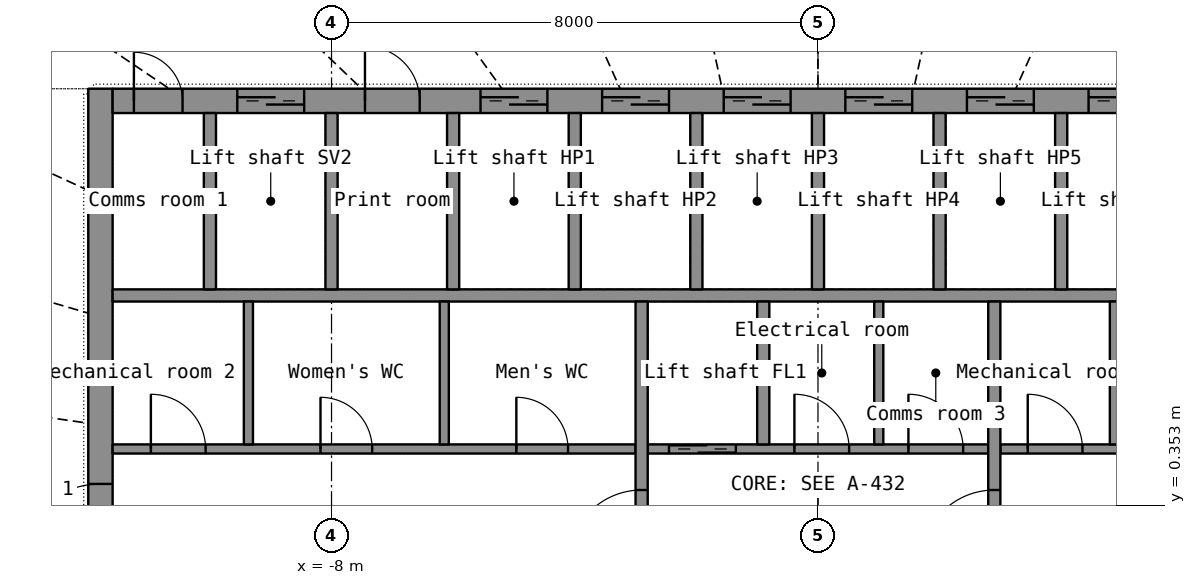
"""IFC4 building model, lengths in metres.
Left out: names, types, materials, properties, quantities, classifications, styles, units other than length and angle.
Written with IfcOpenShell. Run it as: python <this file> out.ifc"""

import sys

from ifc_helpers import new_model, si_unit, direction, frame, frame_2d, origin, place, context, subcontext, project, spatial, rectangle, extrude, element, fill, save


model = new_model("IFC4")
c1 = context("Model", 3, precision=1e-05, world=origin(), true_north=direction((0.0, 1.0)))
c2 = subcontext(c1, "Body", "Model", "MODEL_VIEW")
j1 = project(units=[si_unit("LENGTHUNIT", "METRE"), si_unit("PLANEANGLEUNIT", "RADIAN")], contexts=[c1])
p1 = place(None, origin())
s1 = spatial("IfcSite", under=j1, at=p1, CompositionType="ELEMENT")
p2 = place(p1, origin())
s2 = spatial("IfcBuilding", under=s1, at=p2, CompositionType="ELEMENT")
p3 = place(p2, frame((0.0, 0.0, 257.8)))
s3 = spatial("IfcBuildingStorey", under=s2, at=p3, CompositionType="ELEMENT", Elevation=257.8)
p4 = place(p3, frame((-11.8, -7.2, 0.0), z_axis=(0.0, 0.0, 1.0), x_axis=(0.0, 1.0, 0.0)))
e1 = element("IfcWall", 1, at=p4, inside=s3, PredefinedType="SHEAR", context=c2, shape_type="SweptSolid", body=[
    extrude(rectangle(XDim=14.4, YDim=0.4, at=frame_2d((7.2, 0.0))), origin(), (0.0, 0.0, 1.0), 3.3),
])
p5 = place(p4, frame((6.5, 0.0, 0.0)))
e2 = element("IfcOpeningElement", 2, at=p5, cuts=e1, PredefinedType="OPENING", context=c2, shape_type="SweptSolid", body=[
    extrude(rectangle(XDim=1.4, YDim=2.2, at=frame_2d((0.7, 1.1))), frame((0.0, 0.21, 0.0), z_axis=(0.0, -1.0, 0.0), x_axis=(1.0, 0.0, 0.0)), (0.0, 0.0, 1.0), 0.42),
])
p6 = place(p3, frame((-11.6, 7.0, 0.0), z_axis=(0.0, 0.0, 1.0), x_axis=(1.0, 0.0, 0.0)))
e3 = element("IfcWall", 3, at=p6, inside=s3, PredefinedType="SHEAR", context=c2, shape_type="SweptSolid", body=[
    extrude(rectangle(XDim=23.2, YDim=0.4, at=frame_2d((11.6, 0.0))), origin(), (0.0, 0.0, 1.0), 3.3),
])
p7 = place(p6, frame((2.05, 0.0, 0.0)))
e4 = element("IfcOpeningElement", 4, at=p7, cuts=e3, PredefinedType="OPENING", context=c2, shape_type="SweptSolid", body=[
    extrude(rectangle(XDim=1.1, YDim=2.2, at=frame_2d((0.55, 1.1))), frame((0.0, 0.21, 0.0), z_axis=(0.0, -1.0, 0.0), x_axis=(1.0, 0.0, 0.0)), (0.0, 0.0, 1.0), 0.42),
])
p8 = place(p6, frame((6.05, 0.0, 0.0)))
e5 = element("IfcOpeningElement", 5, at=p8, cuts=e3, PredefinedType="OPENING", context=c2, shape_type="SweptSolid", body=[
    extrude(rectangle(XDim=1.1, YDim=2.2, at=frame_2d((0.55, 1.1))), frame((0.0, 0.21, 0.0), z_axis=(0.0, -1.0, 0.0), x_axis=(1.0, 0.0, 0.0)), (0.0, 0.0, 1.0), 0.42),
])
p9 = place(p6, frame((8.05, 0.0, 0.0)))
e6 = element("IfcOpeningElement", 6, at=p9, cuts=e3, PredefinedType="OPENING", context=c2, shape_type="SweptSolid", body=[
    extrude(rectangle(XDim=1.1, YDim=2.2, at=frame_2d((0.55, 1.1))), frame((0.0, 0.21, 0.0), z_axis=(0.0, -1.0, 0.0), x_axis=(1.0, 0.0, 0.0)), (0.0, 0.0, 1.0), 0.42),
])
p10 = place(p6, frame((10.05, 0.0, 0.0)))
e7 = element("IfcOpeningElement", 7, at=p10, cuts=e3, PredefinedType="OPENING", context=c2, shape_type="SweptSolid", body=[
    extrude(rectangle(XDim=1.1, YDim=2.2, at=frame_2d((0.55, 1.1))), frame((0.0, 0.21, 0.0), z_axis=(0.0, -1.0, 0.0), x_axis=(1.0, 0.0, 0.0)), (0.0, 0.0, 1.0), 0.42),
])
p11 = place(p6, frame((12.05, 0.0, 0.0)))
e8 = element("IfcOpeningElement", 8, at=p11, cuts=e3, PredefinedType="OPENING", context=c2, shape_type="SweptSolid", body=[
    extrude(rectangle(XDim=1.1, YDim=2.2, at=frame_2d((0.55, 1.1))), frame((0.0, 0.21, 0.0), z_axis=(0.0, -1.0, 0.0), x_axis=(1.0, 0.0, 0.0)), (0.0, 0.0, 1.0), 0.42),
])
p12 = place(p6, frame((14.05, 0.0, 0.0)))
e9 = element("IfcOpeningElement", 9, at=p12, cuts=e3, PredefinedType="OPENING", context=c2, shape_type="SweptSolid", body=[
    extrude(rectangle(XDim=1.1, YDim=2.2, at=frame_2d((0.55, 1.1))), frame((0.0, 0.21, 0.0), z_axis=(0.0, -1.0, 0.0), x_axis=(1.0, 0.0, 0.0)), (0.0, 0.0, 1.0), 0.42),
])
p13 = place(p6, frame((16.05, 0.0, 0.0)))
e10 = element("IfcOpeningElement", 10, at=p13, cuts=e3, PredefinedType="OPENING", context=c2, shape_type="SweptSolid", body=[
    extrude(rectangle(XDim=1.1, YDim=2.2, at=frame_2d((0.55, 1.1))), frame((0.0, 0.21, 0.0), z_axis=(0.0, -1.0, 0.0), x_axis=(1.0, 0.0, 0.0)), (0.0, 0.0, 1.0), 0.42),
])
p14 = place(p6, frame((18.05, 0.0, 0.0)))
e11 = element("IfcOpeningElement", 11, at=p14, cuts=e3, PredefinedType="OPENING", context=c2, shape_type="SweptSolid", body=[
    extrude(rectangle(XDim=1.1, YDim=2.2, at=frame_2d((0.55, 1.1))), frame((0.0, 0.21, 0.0), z_axis=(0.0, -1.0, 0.0), x_axis=(1.0, 0.0, 0.0)), (0.0, 0.0, 1.0), 0.42),
])
p15 = place(p6, frame((20.05, 0.0, 0.0)))
e12 = element("IfcOpeningElement", 12, at=p15, cuts=e3, PredefinedType="OPENING", context=c2, shape_type="SweptSolid", body=[
    extrude(rectangle(XDim=1.1, YDim=2.2, at=frame_2d((0.55, 1.1))), frame((0.0, 0.21, 0.0), z_axis=(0.0, -1.0, 0.0), x_axis=(1.0, 0.0, 0.0)), (0.0, 0.0, 1.0), 0.42),
])
p16 = place(p6, frame((4.15, 0.0, 0.0)))
e13 = element("IfcOpeningElement", 13, at=p16, cuts=e3, PredefinedType="OPENING", context=c2, shape_type="SweptSolid", body=[
    extrude(rectangle(XDim=0.9, YDim=2.1, at=frame_2d((0.45, 1.05))), frame((0.0, 0.21, 0.0), z_axis=(0.0, -1.0, 0.0), x_axis=(1.0, 0.0, 0.0)), (0.0, 0.0, 1.0), 0.42),
])
p17 = place(p6, frame((0.35, 0.0, 0.0)))
e14 = element("IfcOpeningElement", 14, at=p17, cuts=e3, PredefinedType="OPENING", context=c2, shape_type="SweptSolid", body=[
    extrude(rectangle(XDim=0.8, YDim=2.05, at=frame_2d((0.4, 1.025))), frame((0.0, 0.21, 0.0), z_axis=(0.0, -1.0, 0.0), x_axis=(1.0, 0.0, 0.0)), (0.0, 0.0, 1.0), 0.42),
])
p18 = place(p6, frame((22.05, 0.0, 0.0)))
e15 = element("IfcOpeningElement", 15, at=p18, cuts=e3, PredefinedType="OPENING", context=c2, shape_type="SweptSolid", body=[
    extrude(rectangle(XDim=0.8, YDim=2.05, at=frame_2d((0.4, 1.025))), frame((0.0, 0.21, 0.0), z_axis=(0.0, -1.0, 0.0), x_axis=(1.0, 0.0, 0.0)), (0.0, 0.0, 1.0), 0.42),
])
p19 = place(p3, frame((-11.6, 3.8, 0.0), z_axis=(0.0, 0.0, 1.0), x_axis=(1.0, 0.0, 0.0)))
e16 = element("IfcWall", 16, at=p19, inside=s3, PredefinedType="SHEAR", context=c2, shape_type="SweptSolid", body=[
    extrude(rectangle(XDim=23.2, YDim=0.2, at=frame_2d((11.6, 0.0))), origin(), (0.0, 0.0, 1.0), 3.3),
])
for number, where, z_axis, x_axis in (
    (17, (-10.0, 3.9, 0.0), (0.0, 0.0, 1.0), (0.0, 1.0, 0.0)),
    (18, (-8.0, 3.9, 0.0), (0.0, 0.0, 1.0), (0.0, 1.0, 0.0)),
    (19, (-6.0, 3.9, 0.0), (0.0, 0.0, 1.0), (0.0, 1.0, 0.0)),
    (20, (-4.0, 3.9, 0.0), (0.0, 0.0, 1.0), (0.0, 1.0, 0.0)),
    (21, (-2.0, 3.9, 0.0), (0.0, 0.0, 1.0), (0.0, 1.0, 0.0)),
    (22, (0.0, 3.9, 0.0), (0.0, 0.0, 1.0), (0.0, 1.0, 0.0)),
    (23, (2.0, 3.9, 0.0), (0.0, 0.0, 1.0), (0.0, 1.0, 0.0)),
    (24, (4.0, 3.9, 0.0), (0.0, 0.0, 1.0), (0.0, 1.0, 0.0)),
):
    element("IfcWall", number, at=place(p3, frame(where, z_axis=z_axis, x_axis=x_axis)), inside=s3, PredefinedType="SHEAR", context=c2, shape_type="SweptSolid", body=[
        extrude(rectangle(XDim=2.9, YDim=0.2, at=frame_2d((1.45, 0.0))), origin(), (0.0, 0.0, 1.0), 3.3),
    ])
p20 = place(p3, frame((-11.6, 1.275, 0.0), z_axis=(0.0, 0.0, 1.0), x_axis=(1.0, 0.0, 0.0)))
e25 = element("IfcWall", 25, at=p20, inside=s3, PredefinedType="PARTITIONING", context=c2, shape_type="SweptSolid", body=[
    extrude(rectangle(XDim=8.6, YDim=0.15, at=frame_2d((4.3, 0.0))), origin(), (0.0, 0.0, 1.0), 3.3),
])
p21 = place(p20, frame((0.629, 0.0, 0.0)))
e26 = element("IfcOpeningElement", 26, at=p21, cuts=e25, PredefinedType="OPENING", context=c2, shape_type="SweptSolid", body=[
    extrude(rectangle(XDim=0.9, YDim=2.1, at=frame_2d((0.45, 1.05))), frame((0.0, 0.085, 0.0), z_axis=(0.0, -1.0, 0.0), x_axis=(1.0, 0.0, 0.0)), (0.0, 0.0, 1.0), 0.17),
])
p22 = place(p20, frame((3.418, 0.0, 0.0)))
e27 = element("IfcOpeningElement", 27, at=p22, cuts=e25, PredefinedType="OPENING", context=c2, shape_type="SweptSolid", body=[
    extrude(rectangle(XDim=0.85, YDim=2.1, at=frame_2d((0.425, 1.05))), frame((0.0, 0.085, 0.0), z_axis=(0.0, -1.0, 0.0), x_axis=(1.0, 0.0, 0.0)), (0.0, 0.0, 1.0), 0.17),
])
p23 = place(p20, frame((6.639, 0.0, 0.0)))
e28 = element("IfcOpeningElement", 28, at=p23, cuts=e25, PredefinedType="OPENING", context=c2, shape_type="SweptSolid", body=[
    extrude(rectangle(XDim=0.85, YDim=2.1, at=frame_2d((0.425, 1.05))), frame((0.0, 0.085, 0.0), z_axis=(0.0, -1.0, 0.0), x_axis=(1.0, 0.0, 0.0)), (0.0, 0.0, 1.0), 0.17),
])
p24 = place(p3, frame((-2.8, 1.275, 0.0), z_axis=(0.0, 0.0, 1.0), x_axis=(1.0, 0.0, 0.0)))
e29 = element("IfcWall", 29, at=p24, inside=s3, PredefinedType="SHEAR", context=c2, shape_type="SweptSolid", body=[
    extrude(rectangle(XDim=5.6, YDim=0.15, at=frame_2d((2.8, 0.0))), origin(), (0.0, 0.0, 1.0), 3.3),
])
p25 = place(p24, frame((0.35, 0.0, 0.0)))
e30 = element("IfcOpeningElement", 30, at=p25, cuts=e29, PredefinedType="OPENING", context=c2, shape_type="SweptSolid", body=[
    extrude(rectangle(XDim=1.1, YDim=2.2, at=frame_2d((0.55, 1.1))), frame((0.0, 0.085, 0.0), z_axis=(0.0, -1.0, 0.0), x_axis=(1.0, 0.0, 0.0)), (0.0, 0.0, 1.0), 0.17),
])
p26 = place(p24, frame((2.413, 0.0, 0.0)))
e31 = element("IfcOpeningElement", 31, at=p26, cuts=e29, PredefinedType="OPENING", context=c2, shape_type="SweptSolid", body=[
    extrude(rectangle(XDim=0.9, YDim=2.1, at=frame_2d((0.45, 1.05))), frame((0.0, 0.085, 0.0), z_axis=(0.0, -1.0, 0.0), x_axis=(1.0, 0.0, 0.0)), (0.0, 0.0, 1.0), 0.17),
])
p27 = place(p24, frame((4.288, 0.0, 0.0)))
e32 = element("IfcOpeningElement", 32, at=p27, cuts=e29, PredefinedType="OPENING", context=c2, shape_type="SweptSolid", body=[
    extrude(rectangle(XDim=0.9, YDim=2.1, at=frame_2d((0.45, 1.05))), frame((0.0, 0.085, 0.0), z_axis=(0.0, -1.0, 0.0), x_axis=(1.0, 0.0, 0.0)), (0.0, 0.0, 1.0), 0.17),
])
p28 = place(p3, frame((3.0, 1.275, 0.0), z_axis=(0.0, 0.0, 1.0), x_axis=(1.0, 0.0, 0.0)))
e33 = element("IfcWall", 33, at=p28, inside=s3, PredefinedType="SHEAR", context=c2, shape_type="SweptSolid", body=[
    extrude(rectangle(XDim=8.6, YDim=0.15, at=frame_2d((4.3, 0.0))), origin(), (0.0, 0.0, 1.0), 3.3),
])
p29 = place(p28, frame((2.05, 0.0, 0.0)))
e34 = element("IfcOpeningElement", 34, at=p29, cuts=e33, PredefinedType="OPENING", context=c2, shape_type="SweptSolid", body=[
    extrude(rectangle(XDim=1.1, YDim=2.15, at=frame_2d((0.55, 1.075))), frame((0.0, 0.085, 0.0), z_axis=(0.0, -1.0, 0.0), x_axis=(1.0, 0.0, 0.0)), (0.0, 0.0, 1.0), 0.17),
])
p30 = place(p28, frame((0.45, 0.0, 0.0)))
e35 = element("IfcOpeningElement", 35, at=p30, cuts=e33, PredefinedType="OPENING", context=c2, shape_type="SweptSolid", body=[
    extrude(rectangle(XDim=0.9, YDim=2.1, at=frame_2d((0.45, 1.05))), frame((0.0, 0.085, 0.0), z_axis=(0.0, -1.0, 0.0), x_axis=(1.0, 0.0, 0.0)), (0.0, 0.0, 1.0), 0.17),
])
p31 = place(p3, frame((-2.9, -3.7, 0.0), z_axis=(0.0, 0.0, 1.0), x_axis=(0.0, 1.0, 0.0)))
e36 = element("IfcWall", 36, at=p31, inside=s3, PredefinedType="SHEAR", context=c2, shape_type="SweptSolid", body=[
    extrude(rectangle(XDim=7.4, YDim=0.2, at=frame_2d((3.7, 0.0))), origin(), (0.0, 0.0, 1.0), 3.3),
])
p32 = place(p31, frame((3.1, 0.0, 0.0)))
e37 = element("IfcOpeningElement", 37, at=p32, cuts=e36, PredefinedType="OPENING", context=c2, shape_type="SweptSolid", body=[
    extrude(rectangle(XDim=1.2, YDim=2.2, at=frame_2d((0.6, 1.1))), frame((0.0, 0.11, 0.0), z_axis=(0.0, -1.0, 0.0), x_axis=(1.0, 0.0, 0.0)), (0.0, 0.0, 1.0), 0.22),
])
p33 = place(p3, frame((2.9, -3.7, 0.0), z_axis=(0.0, 0.0, 1.0), x_axis=(0.0, 1.0, 0.0)))
e38 = element("IfcWall", 38, at=p33, inside=s3, PredefinedType="SHEAR", context=c2, shape_type="SweptSolid", body=[
    extrude(rectangle(XDim=7.4, YDim=0.2, at=frame_2d((3.7, 0.0))), origin(), (0.0, 0.0, 1.0), 3.3),
])
p34 = place(p33, frame((3.1, 0.0, 0.0)))
e39 = element("IfcOpeningElement", 39, at=p34, cuts=e38, PredefinedType="OPENING", context=c2, shape_type="SweptSolid", body=[
    extrude(rectangle(XDim=1.2, YDim=2.2, at=frame_2d((0.6, 1.1))), frame((0.0, 0.11, 0.0), z_axis=(0.0, -1.0, 0.0), x_axis=(1.0, 0.0, 0.0)), (0.0, 0.0, 1.0), 0.22),
])
for number, where, z_axis, x_axis in (
    (40, (-0.9, 1.35, 0.0), (0.0, 0.0, 1.0), (0.0, 1.0, 0.0)),
    (41, (4.9, 1.35, 0.0), (0.0, 0.0, 1.0), (0.0, 1.0, 0.0)),
):
    element("IfcWall", number, at=place(p3, frame(where, z_axis=z_axis, x_axis=x_axis)), inside=s3, PredefinedType="SHEAR", context=c2, shape_type="SweptSolid", body=[
        extrude(rectangle(XDim=2.35, YDim=0.2, at=frame_2d((1.175, 0.0))), origin(), (0.0, 0.0, 1.0), 3.3),
    ])
for number, where, z_axis, x_axis in (
    (42, (-9.367, 1.35, 0.0), (0.0, 0.0, 1.0), (0.0, 1.0, 0.0)),
    (43, (-6.146, 1.35, 0.0), (0.0, 0.0, 1.0), (0.0, 1.0, 0.0)),
    (44, (1.0, 1.35, 0.0), (0.0, 0.0, 1.0), (0.0, 1.0, 0.0)),
):
    element("IfcWall", number, at=place(p3, frame(where, z_axis=z_axis, x_axis=x_axis)), inside=s3, PredefinedType="PARTITIONING", context=c2, shape_type="SweptSolid", body=[
        extrude(rectangle(XDim=2.35, YDim=0.15, at=frame_2d((1.175, 0.0))), origin(), (0.0, 0.0, 1.0), 3.3),
    ])
p35 = place(p7, origin())
e45 = element("IfcDoor", 45, at=p35, inside=s3, OperationType="DOUBLE_DOOR_SLIDING", PredefinedType="DOOR", context=c2, shape_type="SweptSolid", body=[
    extrude(rectangle(XDim=1.1, YDim=2.2, at=frame_2d((0.55, 1.1))), frame((0.0, 0.025, 0.0), z_axis=(0.0, -1.0, 0.0), x_axis=(1.0, 0.0, 0.0)), (0.0, 0.0, 1.0), 0.05),
])
fill(e4, e45)
p36 = place(p8, origin())
e46 = element("IfcDoor", 46, at=p36, inside=s3, OperationType="DOUBLE_DOOR_SLIDING", PredefinedType="DOOR", context=c2, shape_type="SweptSolid", body=[
    extrude(rectangle(XDim=1.1, YDim=2.2, at=frame_2d((0.55, 1.1))), frame((0.0, 0.025, 0.0), z_axis=(0.0, -1.0, 0.0), x_axis=(1.0, 0.0, 0.0)), (0.0, 0.0, 1.0), 0.05),
])
fill(e5, e46)
p37 = place(p9, origin())
e47 = element("IfcDoor", 47, at=p37, inside=s3, OperationType="DOUBLE_DOOR_SLIDING", PredefinedType="DOOR", context=c2, shape_type="SweptSolid", body=[
    extrude(rectangle(XDim=1.1, YDim=2.2, at=frame_2d((0.55, 1.1))), frame((0.0, 0.025, 0.0), z_axis=(0.0, -1.0, 0.0), x_axis=(1.0, 0.0, 0.0)), (0.0, 0.0, 1.0), 0.05),
])
fill(e6, e47)
p38 = place(p10, origin())
e48 = element("IfcDoor", 48, at=p38, inside=s3, OperationType="DOUBLE_DOOR_SLIDING", PredefinedType="DOOR", context=c2, shape_type="SweptSolid", body=[
    extrude(rectangle(XDim=1.1, YDim=2.2, at=frame_2d((0.55, 1.1))), frame((0.0, 0.025, 0.0), z_axis=(0.0, -1.0, 0.0), x_axis=(1.0, 0.0, 0.0)), (0.0, 0.0, 1.0), 0.05),
])
fill(e7, e48)
p39 = place(p11, origin())
e49 = element("IfcDoor", 49, at=p39, inside=s3, OperationType="DOUBLE_DOOR_SLIDING", PredefinedType="DOOR", context=c2, shape_type="SweptSolid", body=[
    extrude(rectangle(XDim=1.1, YDim=2.2, at=frame_2d((0.55, 1.1))), frame((0.0, 0.025, 0.0), z_axis=(0.0, -1.0, 0.0), x_axis=(1.0, 0.0, 0.0)), (0.0, 0.0, 1.0), 0.05),
])
fill(e8, e49)
p40 = place(p12, origin())
e50 = element("IfcDoor", 50, at=p40, inside=s3, OperationType="DOUBLE_DOOR_SLIDING", PredefinedType="DOOR", context=c2, shape_type="SweptSolid", body=[
    extrude(rectangle(XDim=1.1, YDim=2.2, at=frame_2d((0.55, 1.1))), frame((0.0, 0.025, 0.0), z_axis=(0.0, -1.0, 0.0), x_axis=(1.0, 0.0, 0.0)), (0.0, 0.0, 1.0), 0.05),
])
fill(e9, e50)
p41 = place(p13, origin())
e51 = element("IfcDoor", 51, at=p41, inside=s3, OperationType="DOUBLE_DOOR_SLIDING", PredefinedType="DOOR", context=c2, shape_type="SweptSolid", body=[
    extrude(rectangle(XDim=1.1, YDim=2.2, at=frame_2d((0.55, 1.1))), frame((0.0, 0.025, 0.0), z_axis=(0.0, -1.0, 0.0), x_axis=(1.0, 0.0, 0.0)), (0.0, 0.0, 1.0), 0.05),
])
fill(e10, e51)
p42 = place(p16, origin())
e52 = element("IfcDoor", 52, at=p42, inside=s3, OperationType="SINGLE_SWING_LEFT", PredefinedType="DOOR", context=c2, shape_type="SweptSolid", body=[
    extrude(rectangle(XDim=0.9, YDim=2.1, at=frame_2d((0.45, 1.05))), frame((0.0, 0.025, 0.0), z_axis=(0.0, -1.0, 0.0), x_axis=(1.0, 0.0, 0.0)), (0.0, 0.0, 1.0), 0.05),
])
fill(e13, e52)
p43 = place(p17, origin())
e53 = element("IfcDoor", 53, at=p43, inside=s3, OperationType="SINGLE_SWING_LEFT", PredefinedType="DOOR", context=c2, shape_type="SweptSolid", body=[
    extrude(rectangle(XDim=0.8, YDim=2.05, at=frame_2d((0.4, 1.025))), frame((0.0, 0.025, 0.0), z_axis=(0.0, -1.0, 0.0), x_axis=(1.0, 0.0, 0.0)), (0.0, 0.0, 1.0), 0.05),
])
fill(e14, e53)
p44 = place(p5, origin())
e54 = element("IfcDoor", 54, at=p44, inside=s3, OperationType="DOUBLE_DOOR_SINGLE_SWING", PredefinedType="DOOR", context=c2, shape_type="SweptSolid", body=[
    extrude(rectangle(XDim=1.4, YDim=2.2, at=frame_2d((0.7, 1.1))), frame((0.0, 0.025, 0.0), z_axis=(0.0, -1.0, 0.0), x_axis=(1.0, 0.0, 0.0)), (0.0, 0.0, 1.0), 0.05),
])
fill(e2, e54)
p45 = place(p32, origin())
e55 = element("IfcDoor", 55, at=p45, inside=s3, OperationType="SINGLE_SWING_LEFT", PredefinedType="DOOR", context=c2, shape_type="SweptSolid", body=[
    extrude(rectangle(XDim=1.2, YDim=2.2, at=frame_2d((0.6, 1.1))), frame((0.0, 0.025, 0.0), z_axis=(0.0, -1.0, 0.0), x_axis=(1.0, 0.0, 0.0)), (0.0, 0.0, 1.0), 0.05),
])
fill(e37, e55)
p46 = place(p34, origin())
e56 = element("IfcDoor", 56, at=p46, inside=s3, OperationType="SINGLE_SWING_LEFT", PredefinedType="DOOR", context=c2, shape_type="SweptSolid", body=[
    extrude(rectangle(XDim=1.2, YDim=2.2, at=frame_2d((0.6, 1.1))), frame((0.0, 0.025, 0.0), z_axis=(0.0, -1.0, 0.0), x_axis=(1.0, 0.0, 0.0)), (0.0, 0.0, 1.0), 0.05),
])
fill(e39, e56)
p47 = place(p25, origin())
e57 = element("IfcDoor", 57, at=p47, inside=s3, OperationType="DOUBLE_DOOR_SLIDING", PredefinedType="DOOR", context=c2, shape_type="SweptSolid", body=[
    extrude(rectangle(XDim=1.1, YDim=2.2, at=frame_2d((0.55, 1.1))), frame((0.0, 0.025, 0.0), z_axis=(0.0, -1.0, 0.0), x_axis=(1.0, 0.0, 0.0)), (0.0, 0.0, 1.0), 0.05),
])
fill(e30, e57)
p48 = place(p21, origin())
e58 = element("IfcDoor", 58, at=p48, inside=s3, OperationType="SINGLE_SWING_LEFT", PredefinedType="DOOR", context=c2, shape_type="SweptSolid", body=[
    extrude(rectangle(XDim=0.9, YDim=2.1, at=frame_2d((0.45, 1.05))), frame((0.0, 0.025, 0.0), z_axis=(0.0, -1.0, 0.0), x_axis=(1.0, 0.0, 0.0)), (0.0, 0.0, 1.0), 0.05),
])
fill(e26, e58)
p49 = place(p22, origin())
e59 = element("IfcDoor", 59, at=p49, inside=s3, OperationType="SINGLE_SWING_LEFT", PredefinedType="DOOR", context=c2, shape_type="SweptSolid", body=[
    extrude(rectangle(XDim=0.85, YDim=2.1, at=frame_2d((0.425, 1.05))), frame((0.0, 0.025, 0.0), z_axis=(0.0, -1.0, 0.0), x_axis=(1.0, 0.0, 0.0)), (0.0, 0.0, 1.0), 0.05),
])
fill(e27, e59)
p50 = place(p23, origin())
e60 = element("IfcDoor", 60, at=p50, inside=s3, OperationType="SINGLE_SWING_LEFT", PredefinedType="DOOR", context=c2, shape_type="SweptSolid", body=[
    extrude(rectangle(XDim=0.85, YDim=2.1, at=frame_2d((0.425, 1.05))), frame((0.0, 0.025, 0.0), z_axis=(0.0, -1.0, 0.0), x_axis=(1.0, 0.0, 0.0)), (0.0, 0.0, 1.0), 0.05),
])
fill(e28, e60)
p51 = place(p26, origin())
e61 = element("IfcDoor", 61, at=p51, inside=s3, OperationType="SINGLE_SWING_LEFT", PredefinedType="DOOR", context=c2, shape_type="SweptSolid", body=[
    extrude(rectangle(XDim=0.9, YDim=2.1, at=frame_2d((0.45, 1.05))), frame((0.0, 0.025, 0.0), z_axis=(0.0, -1.0, 0.0), x_axis=(1.0, 0.0, 0.0)), (0.0, 0.0, 1.0), 0.05),
])
fill(e31, e61)
p52 = place(p27, origin())
e62 = element("IfcDoor", 62, at=p52, inside=s3, OperationType="SINGLE_SWING_LEFT", PredefinedType="DOOR", context=c2, shape_type="SweptSolid", body=[
    extrude(rectangle(XDim=0.9, YDim=2.1, at=frame_2d((0.45, 1.05))), frame((0.0, 0.025, 0.0), z_axis=(0.0, -1.0, 0.0), x_axis=(1.0, 0.0, 0.0)), (0.0, 0.0, 1.0), 0.05),
])
fill(e32, e62)
p53 = place(p30, origin())
e63 = element("IfcDoor", 63, at=p53, inside=s3, OperationType="SINGLE_SWING_LEFT", PredefinedType="DOOR", context=c2, shape_type="SweptSolid", body=[
    extrude(rectangle(XDim=0.9, YDim=2.1, at=frame_2d((0.45, 1.05))), frame((0.0, 0.025, 0.0), z_axis=(0.0, -1.0, 0.0), x_axis=(1.0, 0.0, 0.0)), (0.0, 0.0, 1.0), 0.05),
])
fill(e35, e63)
save(model, sys.argv[1])
